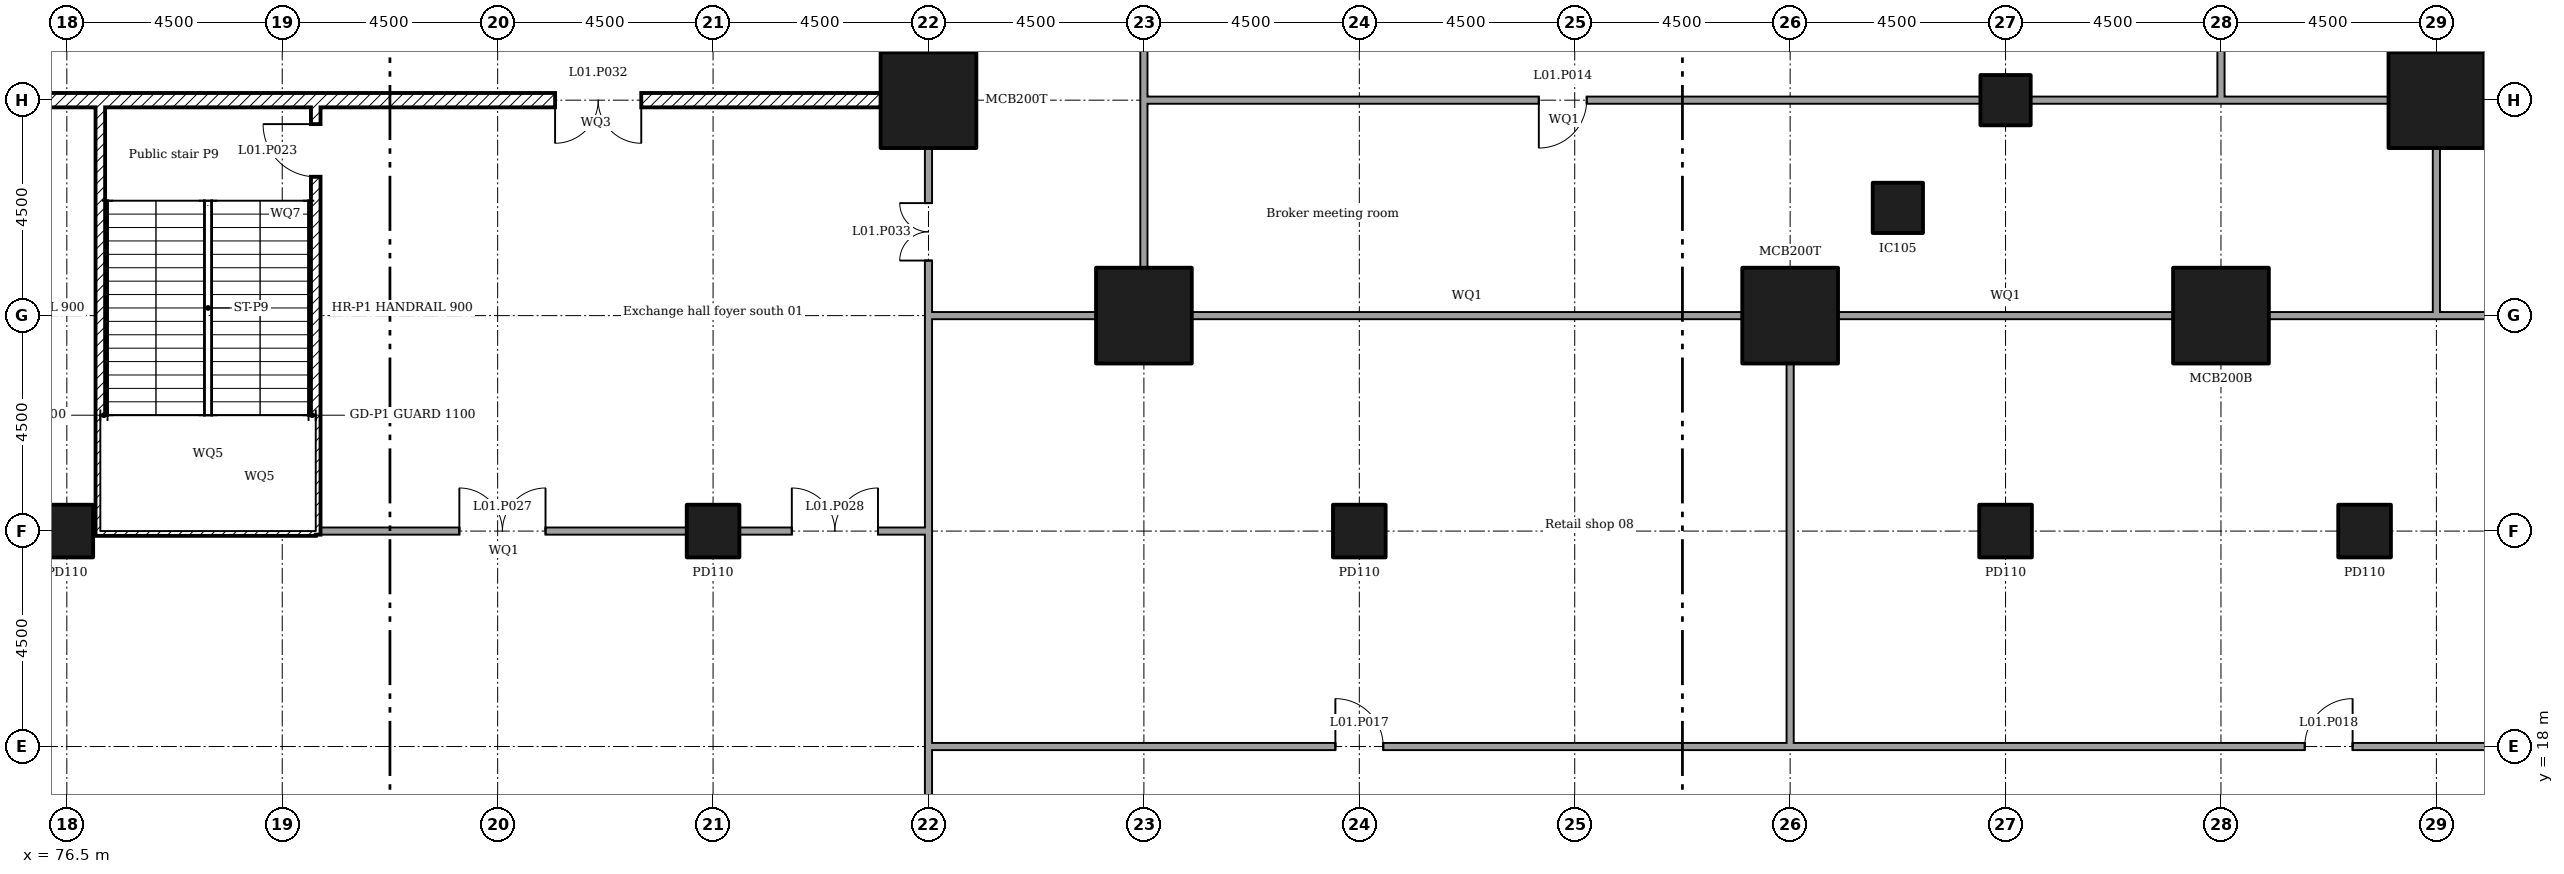
"""IFC4 building model, lengths in metres.
Left out: names, types, materials, properties, quantities, classifications, styles, units other than length and angle.
Written with IfcOpenShell. Run it as: python <this file> out.ifc"""

import sys

from ifc_helpers import new_model, si_unit, direction, frame, frame_2d, origin, origin_2d, place, context, subcontext, project, spatial, rectangle, extrude, element, fill, save


model = new_model("IFC4")
c1 = context("Model", 3, precision=1e-05, world=origin(), true_north=direction((0.0, 1.0)))
c2 = subcontext(c1, "Body", "Model", "MODEL_VIEW")
j1 = project(units=[si_unit("LENGTHUNIT", "METRE"), si_unit("PLANEANGLEUNIT", "RADIAN")], contexts=[c1])
p1 = place(None, origin())
s1 = spatial("IfcSite", under=j1, at=p1, CompositionType="ELEMENT")
p2 = place(p1, origin())
s2 = spatial("IfcBuilding", under=s1, at=p2, CompositionType="ELEMENT")
p3 = place(p2, frame((0.0, 0.0, 6.0)))
s3 = spatial("IfcBuildingStorey", under=s2, at=p3, CompositionType="ELEMENT", Elevation=6.0)
for number, where in (
    (1, (94.5, 31.5, 0.0)),
    (2, (99.0, 27.0, 0.0)),
    (3, (112.5, 27.0, 0.0)),
    (4, (121.5, 27.0, 0.0)),
    (5, (126.0, 31.5, 0.0)),
):
    element("IfcColumn", number, at=place(p3, frame(where)), inside=s3, PredefinedType="COLUMN", context=c2, shape_type="SweptSolid", body=[
        extrude(rectangle(XDim=2.0, YDim=2.0, at=origin_2d()), origin(), (0.0, 0.0, 1.0), 5.5),
    ])
for number, where in (
    (6, (114.75, 29.25, 0.0)),
    (7, (117.0, 31.5, 0.0)),
):
    element("IfcColumn", number, at=place(p3, frame(where)), inside=s3, PredefinedType="COLUMN", context=c2, shape_type="SweptSolid", body=[
        extrude(rectangle(XDim=1.05, YDim=1.05, at=origin_2d()), origin(), (0.0, 0.0, 1.0), 5.5),
    ])
for number, where in (
    (8, (76.5, 22.5, 0.0)),
    (9, (90.0, 22.5, 0.0)),
    (10, (103.5, 22.5, 0.0)),
    (11, (117.0, 22.5, 0.0)),
    (12, (124.5, 22.5, 0.0)),
):
    element("IfcColumn", number, at=place(p3, frame(where)), inside=s3, PredefinedType="COLUMN", context=c2, shape_type="SweptSolid", body=[
        extrude(rectangle(XDim=1.1, YDim=1.1, at=origin_2d()), origin(), (0.0, 0.0, 1.0), 5.5),
    ])
p4 = place(p3, frame((81.8, 22.5, 0.0)))
e13 = element("IfcWall", 13, at=p4, inside=s3, PredefinedType="PARTITIONING", context=c2, shape_type="SweptSolid", body=[
    extrude(rectangle(XDim=7.655, YDim=0.15, at=frame_2d((3.828, 0.0))), origin(), (0.0, 0.0, 1.0), 5.05),
])
p5 = place(p4, frame((2.9, 0.0, 0.0)))
e14 = element("IfcOpeningElement", 14, at=p5, cuts=e13, PredefinedType="OPENING", context=c2, shape_type="SweptSolid", body=[
    extrude(rectangle(XDim=1.8, YDim=2.1, at=frame_2d((0.9, 1.05))), frame((0.0, 0.085, 0.0), z_axis=(0.0, -1.0, 0.0), x_axis=(1.0, 0.0, 0.0)), (0.0, 0.0, 1.0), 0.17),
])
p6 = place(p3, frame((90.545, 22.5, 0.0)))
e15 = element("IfcWall", 15, at=p6, inside=s3, PredefinedType="PARTITIONING", context=c2, shape_type="SweptSolid", body=[
    extrude(rectangle(XDim=4.03, YDim=0.15, at=frame_2d((2.015, 0.0))), origin(), (0.0, 0.0, 1.0), 5.05),
])
p7 = place(p6, frame((1.1, 0.0, 0.0)))
e16 = element("IfcOpeningElement", 16, at=p7, cuts=e15, PredefinedType="OPENING", context=c2, shape_type="SweptSolid", body=[
    extrude(rectangle(XDim=1.8, YDim=2.1, at=frame_2d((0.9, 1.05))), frame((0.0, 0.085, 0.0), z_axis=(0.0, -1.0, 0.0), x_axis=(1.0, 0.0, 0.0)), (0.0, 0.0, 1.0), 0.17),
])
p8 = place(p3, frame((94.5, 9.3, 0.0), z_axis=(0.0, 0.0, 1.0), x_axis=(0.0, 1.0, 0.0)))
e17 = element("IfcWall", 17, at=p8, inside=s3, PredefinedType="PARTITIONING", context=c2, shape_type="SweptSolid", body=[
    extrude(rectangle(XDim=8.775, YDim=0.15, at=frame_2d((4.387, 0.0))), origin(), (0.0, 0.0, 1.0), 5.05),
])
p9 = place(p8, frame((3.45, 0.0, 0.0)))
e18 = element("IfcOpeningElement", 18, at=p9, cuts=e17, PredefinedType="OPENING", context=c2, shape_type="SweptSolid", body=[
    extrude(rectangle(XDim=1.8, YDim=2.1, at=frame_2d((0.9, 1.05))), frame((0.0, 0.085, 0.0), z_axis=(0.0, -1.0, 0.0), x_axis=(1.0, 0.0, 0.0)), (0.0, 0.0, 1.0), 0.17),
])
p10 = place(p3, frame((94.5, 18.0, 0.0), z_axis=(0.0, 0.0, 1.0), x_axis=(0.0, 1.0, 0.0)))
e19 = element("IfcWall", 19, at=p10, inside=s3, PredefinedType="PARTITIONING", context=c2, shape_type="SweptSolid", body=[
    extrude(rectangle(XDim=4.425, YDim=0.15, at=frame_2d((2.212, 0.0))), origin(), (0.0, 0.0, 1.0), 5.05),
])
p11 = place(p3, frame((77.1, 22.5, 0.0)))
e20 = element("IfcWall", 20, at=p11, inside=s3, PredefinedType="SOLIDWALL", context=c2, shape_type="SweptSolid", body=[
    extrude(rectangle(XDim=4.6, YDim=0.2, at=frame_2d((2.3, 0.0))), origin(), (0.0, 0.0, 1.0), 5.05),
])
p12 = place(p3, frame((81.6, 31.5, 0.0)))
e21 = element("IfcWall", 21, at=p12, inside=s3, PredefinedType="SOLIDWALL", context=c2, shape_type="SweptSolid", body=[
    extrude(rectangle(XDim=11.905, YDim=0.3, at=frame_2d((5.952, 0.0))), origin(), (0.0, 0.0, 1.0), 5.5),
])
p13 = place(p12, frame((5.1, 0.0, 0.0)))
e22 = element("IfcOpeningElement", 22, at=p13, cuts=e21, PredefinedType="OPENING", context=c2, shape_type="SweptSolid", body=[
    extrude(rectangle(XDim=1.8, YDim=2.1, at=frame_2d((0.9, 1.05))), frame((0.0, 0.16, 0.0), z_axis=(0.0, -1.0, 0.0), x_axis=(1.0, 0.0, 0.0)), (0.0, 0.0, 1.0), 0.32),
])
p14 = place(p3, frame((94.5, 26.925, 0.0), z_axis=(0.0, 0.0, 1.0), x_axis=(0.0, 1.0, 0.0)))
e23 = element("IfcWall", 23, at=p14, inside=s3, PredefinedType="PARTITIONING", context=c2, shape_type="SweptSolid", body=[
    extrude(rectangle(XDim=3.58, YDim=0.15, at=frame_2d((1.79, 0.0))), origin(), (0.0, 0.0, 1.0), 5.05),
])
p15 = place(p14, frame((1.225, 0.0, 0.0)))
e24 = element("IfcOpeningElement", 24, at=p15, cuts=e23, PredefinedType="OPENING", context=c2, shape_type="SweptSolid", body=[
    extrude(rectangle(XDim=1.2, YDim=2.1, at=frame_2d((0.6, 1.05))), frame((0.0, 0.085, 0.0), z_axis=(0.0, -1.0, 0.0), x_axis=(1.0, 0.0, 0.0)), (0.0, 0.0, 1.0), 0.17),
])
p16 = place(p3, frame((94.5, 22.5, 0.0), z_axis=(0.0, 0.0, 1.0), x_axis=(0.0, 1.0, 0.0)))
e25 = element("IfcWall", 25, at=p16, inside=s3, PredefinedType="PARTITIONING", context=c2, shape_type="SweptSolid", body=[
    extrude(rectangle(XDim=4.5, YDim=0.15, at=frame_2d((2.25, 0.0))), origin(), (0.0, 0.0, 1.0), 5.05),
])
p17 = place(p3, frame((81.7, 22.425, 0.0), z_axis=(0.0, 0.0, 1.0), x_axis=(0.0, 1.0, 0.0)))
e26 = element("IfcWall", 26, at=p17, inside=s3, PredefinedType="SOLIDWALL", context=c2, shape_type="SweptSolid", body=[
    extrude(rectangle(XDim=8.925, YDim=0.2, at=frame_2d((4.462, 0.0))), origin(), (0.0, 0.0, 1.0), 5.05),
])
p18 = place(p17, frame((7.475, 0.0, 0.0)))
e27 = element("IfcOpeningElement", 27, at=p18, cuts=e26, PredefinedType="OPENING", context=c2, shape_type="SweptSolid", body=[
    extrude(rectangle(XDim=1.1, YDim=2.1, at=frame_2d((0.55, 1.05))), frame((0.0, 0.11, 0.0), z_axis=(0.0, -1.0, 0.0), x_axis=(1.0, 0.0, 0.0)), (0.0, 0.0, 1.0), 0.22),
])
p19 = place(p3, frame((94.5, 32.495, 0.0), z_axis=(0.0, 0.0, 1.0), x_axis=(0.0, 1.0, 0.0)))
e28 = element("IfcWall", 28, at=p19, inside=s3, PredefinedType="SOLIDWALL", context=c2, shape_type="SweptSolid", body=[
    extrude(rectangle(XDim=11.51, YDim=0.3, at=frame_2d((5.755, 0.0))), origin(), (0.0, 0.0, 1.0), 10.05),
])
p20 = place(p19, frame((4.85, 0.0, 0.0)))
e29 = element("IfcOpeningElement", 29, at=p20, cuts=e28, PredefinedType="OPENING", context=c2, shape_type="SweptSolid", body=[
    extrude(rectangle(XDim=1.8, YDim=2.1, at=frame_2d((0.9, 1.05))), frame((0.0, 0.16, 0.0), z_axis=(0.0, -1.0, 0.0), x_axis=(1.0, 0.0, 0.0)), (0.0, 0.0, 1.0), 0.32),
])
p21 = place(p3, frame((73.295, 31.5, 0.0)))
e30 = element("IfcWall", 30, at=p21, inside=s3, PredefinedType="SOLIDWALL", context=c2, shape_type="SweptSolid", body=[
    extrude(rectangle(XDim=4.005, YDim=0.3, at=frame_2d((2.002, 0.0))), origin(), (0.0, 0.0, 1.0), 5.5),
])
p22 = place(p21, frame((1.35, 0.0, 0.0)))
e31 = element("IfcOpeningElement", 31, at=p22, cuts=e30, PredefinedType="OPENING", context=c2, shape_type="SweptSolid", body=[
    extrude(rectangle(XDim=1.2, YDim=2.1, at=frame_2d((0.6, 1.05))), frame((0.0, 0.16, 0.0), z_axis=(0.0, -1.0, 0.0), x_axis=(1.0, 0.0, 0.0)), (0.0, 0.0, 1.0), 0.32),
])
p23 = place(p3, frame((77.2, 31.5, 0.0)))
e32 = element("IfcWall", 32, at=p23, inside=s3, PredefinedType="SOLIDWALL", context=c2, shape_type="SweptSolid", body=[
    extrude(rectangle(XDim=4.5, YDim=0.3, at=frame_2d((2.25, 0.0))), origin(), (0.0, 0.0, 1.0), 5.5),
])
p24 = place(p3, frame((94.575, 18.0, 0.0)))
e33 = element("IfcWall", 33, at=p24, inside=s3, PredefinedType="PARTITIONING", context=c2, shape_type="SweptSolid", body=[
    extrude(rectangle(XDim=18.0, YDim=0.15, at=frame_2d((9.0, 0.0))), origin(), (0.0, 0.0, 1.0), 5.05),
])
p25 = place(p24, frame((8.425, 0.0, 0.0)))
e34 = element("IfcOpeningElement", 34, at=p25, cuts=e33, PredefinedType="OPENING", context=c2, shape_type="SweptSolid", body=[
    extrude(rectangle(XDim=1.0, YDim=2.1, at=frame_2d((0.5, 1.05))), frame((0.0, 0.085, 0.0), z_axis=(0.0, -1.0, 0.0), x_axis=(1.0, 0.0, 0.0)), (0.0, 0.0, 1.0), 0.17),
])
p26 = place(p3, frame((112.5, 18.0, 0.0)))
e35 = element("IfcWall", 35, at=p26, inside=s3, PredefinedType="PARTITIONING", context=c2, shape_type="SweptSolid", body=[
    extrude(rectangle(XDim=22.425, YDim=0.15, at=frame_2d((11.212, 0.0))), origin(), (0.0, 0.0, 1.0), 5.05),
])
p27 = place(p26, frame((10.75, 0.0, 0.0)))
e36 = element("IfcOpeningElement", 36, at=p27, cuts=e35, PredefinedType="OPENING", context=c2, shape_type="SweptSolid", body=[
    extrude(rectangle(XDim=1.0, YDim=2.1, at=frame_2d((0.5, 1.05))), frame((0.0, 0.085, 0.0), z_axis=(0.0, -1.0, 0.0), x_axis=(1.0, 0.0, 0.0)), (0.0, 0.0, 1.0), 0.17),
])
p28 = place(p3, frame((99.0, 31.425, 0.0), z_axis=(0.0, 0.0, 1.0), x_axis=(0.0, 1.0, 0.0)))
e37 = element("IfcWall", 37, at=p28, inside=s3, PredefinedType="PARTITIONING", context=c2, shape_type="SweptSolid", body=[
    extrude(rectangle(XDim=4.055, YDim=0.15, at=frame_2d((2.027, 0.0))), origin(), (0.0, 0.0, 1.0), 5.05),
])
p29 = place(p28, frame((1.175, 0.0, 0.0)))
e38 = element("IfcOpeningElement", 38, at=p29, cuts=e37, PredefinedType="OPENING", context=c2, shape_type="SweptSolid", body=[
    extrude(rectangle(XDim=1.8, YDim=2.1, at=frame_2d((0.9, 1.05))), frame((0.0, 0.085, 0.0), z_axis=(0.0, -1.0, 0.0), x_axis=(1.0, 0.0, 0.0)), (0.0, 0.0, 1.0), 0.17),
])
p30 = place(p3, frame((99.0, 27.995, 0.0), z_axis=(0.0, 0.0, 1.0), x_axis=(0.0, 1.0, 0.0)))
e39 = element("IfcWall", 39, at=p30, inside=s3, PredefinedType="PARTITIONING", context=c2, shape_type="SweptSolid", body=[
    extrude(rectangle(XDim=3.505, YDim=0.15, at=frame_2d((1.752, 0.0))), origin(), (0.0, 0.0, 1.0), 5.05),
])
p31 = place(p3, frame((94.575, 27.0, 0.0)))
e40 = element("IfcWall", 40, at=p31, inside=s3, PredefinedType="PARTITIONING", context=c2, shape_type="SweptSolid", body=[
    extrude(rectangle(XDim=3.43, YDim=0.15, at=frame_2d((1.715, 0.0))), origin(), (0.0, 0.0, 1.0), 5.05),
])
p32 = place(p3, frame((99.075, 31.5, 0.0)))
e41 = element("IfcWall", 41, at=p32, inside=s3, PredefinedType="PARTITIONING", context=c2, shape_type="SweptSolid", body=[
    extrude(rectangle(XDim=17.405, YDim=0.15, at=frame_2d((8.703, 0.0))), origin(), (0.0, 0.0, 1.0), 5.05),
])
p33 = place(p32, frame((8.175, 0.0, 0.0)))
e42 = element("IfcOpeningElement", 42, at=p33, cuts=e41, PredefinedType="OPENING", context=c2, shape_type="SweptSolid", body=[
    extrude(rectangle(XDim=1.0, YDim=2.1, at=frame_2d((0.5, 1.05))), frame((0.0, 0.085, 0.0), z_axis=(0.0, -1.0, 0.0), x_axis=(1.0, 0.0, 0.0)), (0.0, 0.0, 1.0), 0.17),
])
p34 = place(p3, frame((117.52, 31.5, 0.0)))
e43 = element("IfcWall", 43, at=p34, inside=s3, PredefinedType="PARTITIONING", context=c2, shape_type="SweptSolid", body=[
    extrude(rectangle(XDim=4.055, YDim=0.15, at=frame_2d((2.027, 0.0))), origin(), (0.0, 0.0, 1.0), 5.05),
])
p35 = place(p3, frame((121.5, 31.575, 0.0), z_axis=(0.0, 0.0, 1.0), x_axis=(0.0, 1.0, 0.0)))
e44 = element("IfcWall", 44, at=p35, inside=s3, PredefinedType="PARTITIONING", context=c2, shape_type="SweptSolid", body=[
    extrude(rectangle(XDim=17.405, YDim=0.15, at=frame_2d((8.703, 0.0))), origin(), (0.0, 0.0, 1.0), 5.05),
])
p36 = place(p35, frame((8.175, 0.0, 0.0)))
e45 = element("IfcOpeningElement", 45, at=p36, cuts=e44, PredefinedType="OPENING", context=c2, shape_type="SweptSolid", body=[
    extrude(rectangle(XDim=1.0, YDim=2.1, at=frame_2d((0.5, 1.05))), frame((0.0, 0.085, 0.0), z_axis=(0.0, -1.0, 0.0), x_axis=(1.0, 0.0, 0.0)), (0.0, 0.0, 1.0), 0.17),
])
p37 = place(p3, frame((121.5, 31.5, 0.0)))
e46 = element("IfcWall", 46, at=p37, inside=s3, PredefinedType="PARTITIONING", context=c2, shape_type="SweptSolid", body=[
    extrude(rectangle(XDim=3.505, YDim=0.15, at=frame_2d((1.752, 0.0))), origin(), (0.0, 0.0, 1.0), 5.05),
])
p38 = place(p3, frame((99.995, 27.0, 0.0)))
e47 = element("IfcWall", 47, at=p38, inside=s3, PredefinedType="PARTITIONING", context=c2, shape_type="SweptSolid", body=[
    extrude(rectangle(XDim=11.51, YDim=0.15, at=frame_2d((5.755, 0.0))), origin(), (0.0, 0.0, 1.0), 5.05),
])
p39 = place(p3, frame((113.495, 27.0, 0.0)))
e48 = element("IfcWall", 48, at=p39, inside=s3, PredefinedType="PARTITIONING", context=c2, shape_type="SweptSolid", body=[
    extrude(rectangle(XDim=7.01, YDim=0.15, at=frame_2d((3.505, 0.0))), origin(), (0.0, 0.0, 1.0), 5.05),
])
p40 = place(p3, frame((122.495, 27.0, 0.0)))
e49 = element("IfcWall", 49, at=p40, inside=s3, PredefinedType="PARTITIONING", context=c2, shape_type="SweptSolid", body=[
    extrude(rectangle(XDim=3.58, YDim=0.15, at=frame_2d((1.79, 0.0))), origin(), (0.0, 0.0, 1.0), 5.05),
])
p41 = place(p3, frame((126.0, 27.075, 0.0), z_axis=(0.0, 0.0, 1.0), x_axis=(0.0, 1.0, 0.0)))
e50 = element("IfcWall", 50, at=p41, inside=s3, PredefinedType="PARTITIONING", context=c2, shape_type="SweptSolid", body=[
    extrude(rectangle(XDim=3.43, YDim=0.15, at=frame_2d((1.715, 0.0))), origin(), (0.0, 0.0, 1.0), 5.05),
])
p42 = place(p3, frame((126.0, 32.495, 0.0), z_axis=(0.0, 0.0, 1.0), x_axis=(0.0, 1.0, 0.0)))
e51 = element("IfcWall", 51, at=p42, inside=s3, PredefinedType="PARTITIONING", context=c2, shape_type="SweptSolid", body=[
    extrude(rectangle(XDim=8.08, YDim=0.15, at=frame_2d((4.04, 0.0))), origin(), (0.0, 0.0, 1.0), 5.05),
])
p43 = place(p3, frame((112.5, 18.075, 0.0), z_axis=(0.0, 0.0, 1.0), x_axis=(0.0, 1.0, 0.0)))
e52 = element("IfcWall", 52, at=p43, inside=s3, PredefinedType="PARTITIONING", context=c2, shape_type="SweptSolid", body=[
    extrude(rectangle(XDim=7.93, YDim=0.15, at=frame_2d((3.965, 0.0))), origin(), (0.0, 0.0, 1.0), 5.05),
])
p44 = place(p3, frame((126.0, 27.0, 0.0)))
e53 = element("IfcWall", 53, at=p44, inside=s3, PredefinedType="PARTITIONING", context=c2, shape_type="SweptSolid", body=[
    extrude(rectangle(XDim=8.925, YDim=0.15, at=frame_2d((4.462, 0.0))), origin(), (0.0, 0.0, 1.0), 5.05),
])
p45 = place(p3, frame((77.2, 22.6, 0.0), z_axis=(0.0, 0.0, 1.0), x_axis=(0.0, 1.0, 0.0)))
e54 = element("IfcWall", 54, at=p45, inside=s3, PredefinedType="SOLIDWALL", context=c2, shape_type="SweptSolid", body=[
    extrude(rectangle(XDim=8.75, YDim=0.2, at=frame_2d((4.375, 0.0))), origin(), (0.0, 0.0, 1.0), 5.05),
])
for number, where, z_axis, x_axis in (
    (55, (81.6, 24.54, -3.0), (0.0, 0.0, 1.0), (-1.0, 0.0, 0.0)),
    (56, (81.6, 23.2, -3.0), (0.0, 0.0, 1.0), (-1.0, 0.0, 0.0)),
):
    element("IfcWall", number, at=place(p3, frame(where, z_axis=z_axis, x_axis=x_axis)), inside=s3, PredefinedType="SOLIDWALL", context=c2, shape_type="SweptSolid", body=[
        extrude(rectangle(XDim=4.3, YDim=0.2, at=frame_2d((2.15, 0.0))), origin(), (0.0, 0.0, 1.0), 5.55),
    ])
p46 = place(p33, frame((1.0, 0.0, 0.0), x_axis=(-1.0, 0.0, 0.0)))
e57 = element("IfcDoor", 57, at=p46, inside=s3, OperationType="SINGLE_SWING_LEFT", PredefinedType="DOOR", context=c2, shape_type="SweptSolid", body=[
    extrude(rectangle(XDim=1.0, YDim=2.1, at=frame_2d((0.5, 1.05))), frame((0.0, 0.025, 0.0), z_axis=(0.0, -1.0, 0.0), x_axis=(1.0, 0.0, 0.0)), (0.0, 0.0, 1.0), 0.05),
])
fill(e42, e57)
p47 = place(p25, origin())
e58 = element("IfcDoor", 58, at=p47, inside=s3, OperationType="SINGLE_SWING_RIGHT", PredefinedType="DOOR", context=c2, shape_type="SweptSolid", body=[
    extrude(rectangle(XDim=1.0, YDim=2.1, at=frame_2d((0.5, 1.05))), frame((0.0, 0.025, 0.0), z_axis=(0.0, -1.0, 0.0), x_axis=(1.0, 0.0, 0.0)), (0.0, 0.0, 1.0), 0.05),
])
fill(e34, e58)
p48 = place(p27, origin())
e59 = element("IfcDoor", 59, at=p48, inside=s3, OperationType="SINGLE_SWING_LEFT", PredefinedType="DOOR", context=c2, shape_type="SweptSolid", body=[
    extrude(rectangle(XDim=1.0, YDim=2.1, at=frame_2d((0.5, 1.05))), frame((0.0, 0.025, 0.0), z_axis=(0.0, -1.0, 0.0), x_axis=(1.0, 0.0, 0.0)), (0.0, 0.0, 1.0), 0.05),
])
fill(e36, e59)
p49 = place(p18, origin())
e60 = element("IfcDoor", 60, at=p49, inside=s3, OperationType="SINGLE_SWING_LEFT", PredefinedType="DOOR", context=c2, shape_type="SweptSolid", body=[
    extrude(rectangle(XDim=1.1, YDim=2.1, at=frame_2d((0.55, 1.05))), frame((0.0, 0.025, 0.0), z_axis=(0.0, -1.0, 0.0), x_axis=(1.0, 0.0, 0.0)), (0.0, 0.0, 1.0), 0.05),
])
fill(e27, e60)
p50 = place(p5, origin())
e61 = element("IfcDoor", 61, at=p50, inside=s3, OperationType="DOUBLE_DOOR_SINGLE_SWING", PredefinedType="DOOR", context=c2, shape_type="SweptSolid", body=[
    extrude(rectangle(XDim=1.8, YDim=2.1, at=frame_2d((0.9, 1.05))), frame((0.0, 0.025, 0.0), z_axis=(0.0, -1.0, 0.0), x_axis=(1.0, 0.0, 0.0)), (0.0, 0.0, 1.0), 0.05),
])
fill(e14, e61)
p51 = place(p7, origin())
e62 = element("IfcDoor", 62, at=p51, inside=s3, OperationType="DOUBLE_DOOR_SINGLE_SWING", PredefinedType="DOOR", context=c2, shape_type="SweptSolid", body=[
    extrude(rectangle(XDim=1.8, YDim=2.1, at=frame_2d((0.9, 1.05))), frame((0.0, 0.025, 0.0), z_axis=(0.0, -1.0, 0.0), x_axis=(1.0, 0.0, 0.0)), (0.0, 0.0, 1.0), 0.05),
])
fill(e16, e62)
p52 = place(p13, frame((1.8, 0.0, 0.0), x_axis=(-1.0, 0.0, 0.0)))
e63 = element("IfcDoor", 63, at=p52, inside=s3, OperationType="DOUBLE_DOOR_SINGLE_SWING", PredefinedType="DOOR", context=c2, shape_type="SweptSolid", body=[
    extrude(rectangle(XDim=1.8, YDim=2.1, at=frame_2d((0.9, 1.05))), frame((0.0, 0.025, 0.0), z_axis=(0.0, -1.0, 0.0), x_axis=(1.0, 0.0, 0.0)), (0.0, 0.0, 1.0), 0.05),
])
fill(e22, e63)
p53 = place(p15, origin())
e64 = element("IfcDoor", 64, at=p53, inside=s3, OperationType="DOUBLE_DOOR_SINGLE_SWING", PredefinedType="DOOR", context=c2, shape_type="SweptSolid", body=[
    extrude(rectangle(XDim=1.2, YDim=2.1, at=frame_2d((0.6, 1.05))), frame((0.0, 0.025, 0.0), z_axis=(0.0, -1.0, 0.0), x_axis=(1.0, 0.0, 0.0)), (0.0, 0.0, 1.0), 0.05),
])
fill(e24, e64)
save(model, sys.argv[1])
